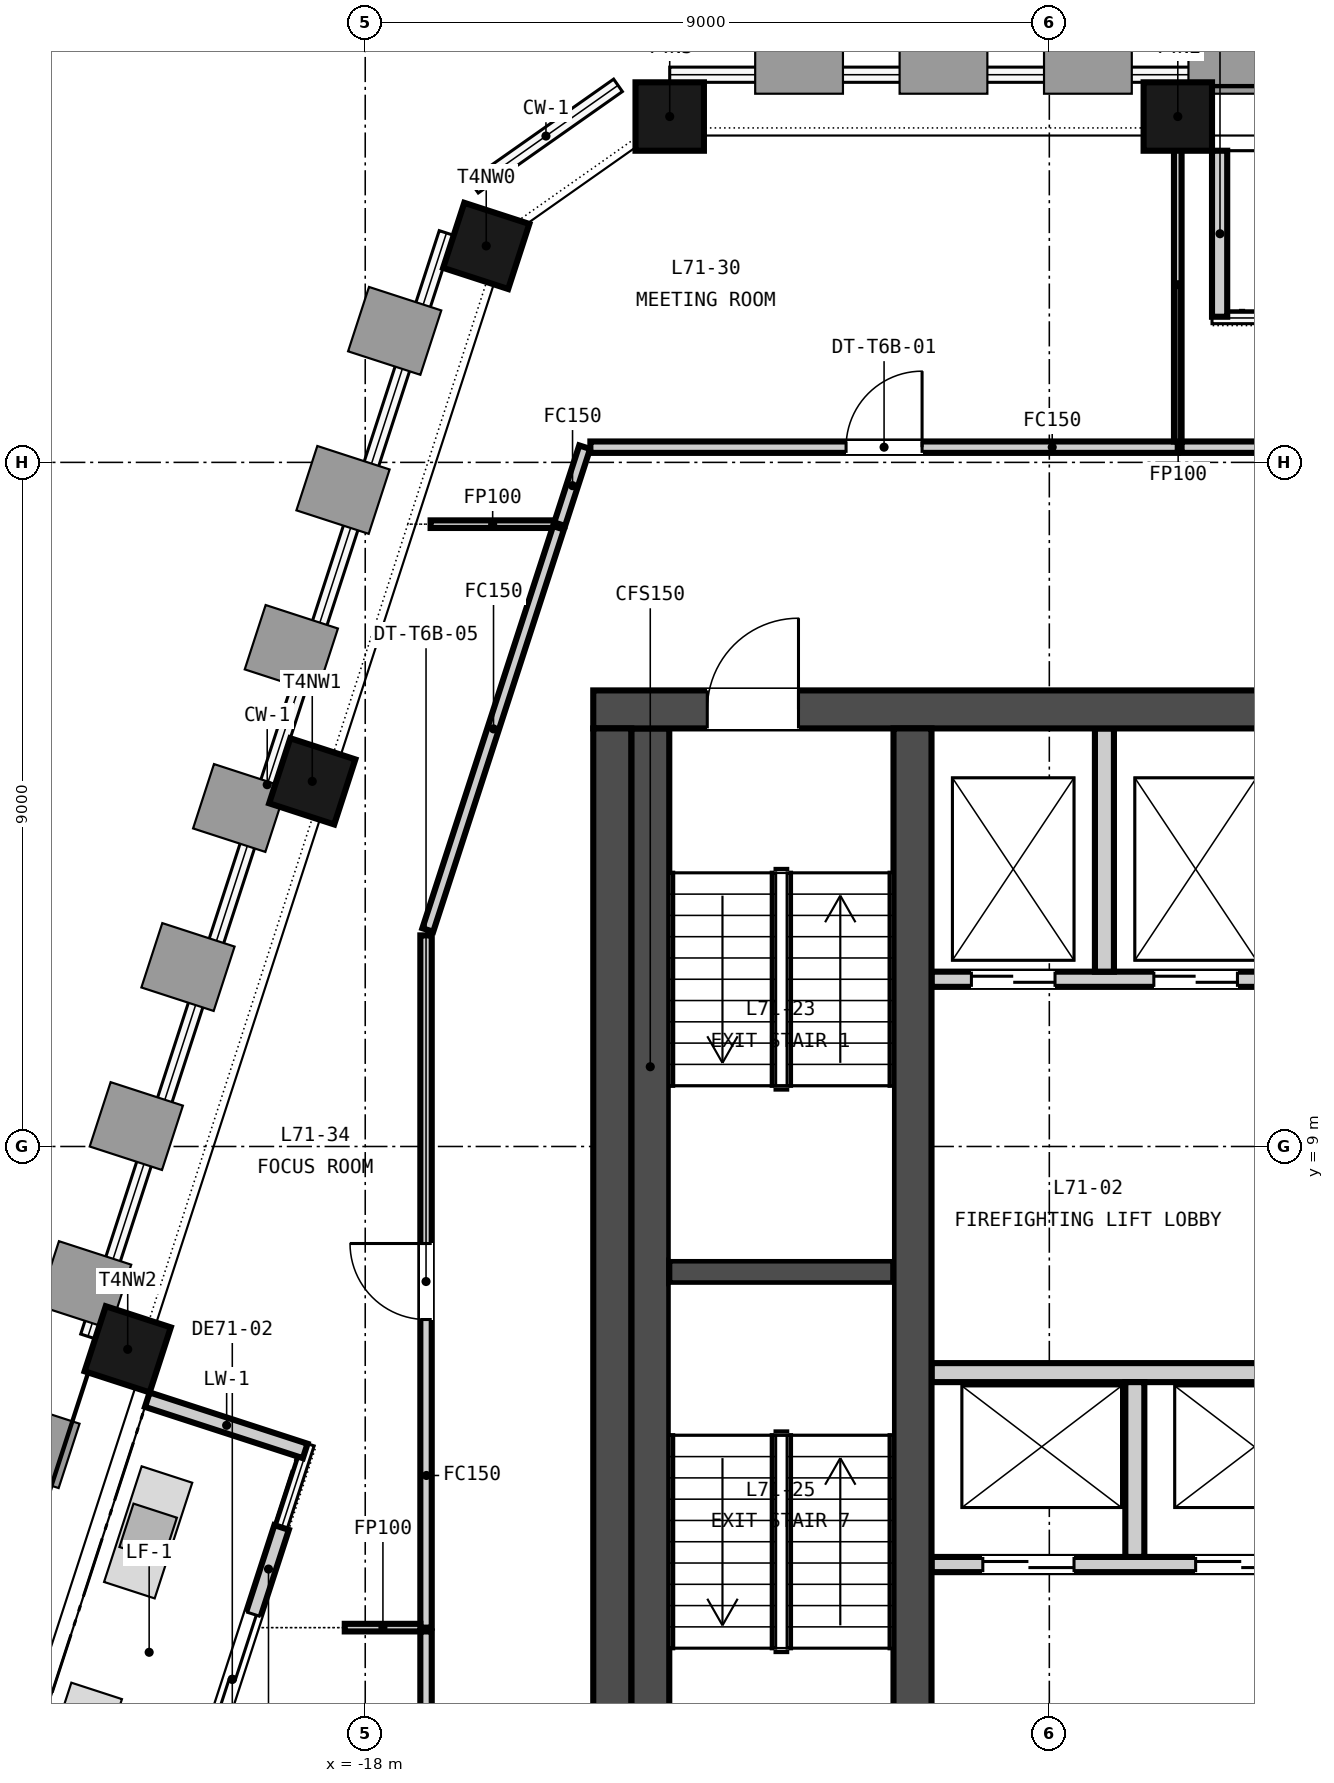
"""IFC4 building model, lengths in metres.
Left out: names, types, materials, properties, quantities, classifications, styles, units other than length and angle.
Written with IfcOpenShell. Run it as: python <this file> out.ifc"""

import sys

from ifc_helpers import new_model, si_unit, direction, frame, frame_2d, origin, origin_2d, place, context, subcontext, project, spatial, rectangle, extrude, element, fill, save


model = new_model("IFC4")
c1 = context("Model", 3, precision=1e-05, world=origin(), true_north=direction((0.0, 1.0)))
c2 = subcontext(c1, "Body", "Model", "MODEL_VIEW")
j1 = project(units=[si_unit("LENGTHUNIT", "METRE"), si_unit("PLANEANGLEUNIT", "RADIAN")], contexts=[c1])
p1 = place(None, origin())
s1 = spatial("IfcSite", under=j1, at=p1, CompositionType="ELEMENT")
p2 = place(p1, origin())
s2 = spatial("IfcBuilding", under=s1, at=p2, CompositionType="ELEMENT")
p3 = place(p2, frame((0.0, 0.0, 279.2)))
s3 = spatial("IfcBuildingStorey", under=s2, at=p3, CompositionType="ELEMENT", Elevation=279.2)
p4 = place(p3, frame((-15.0, 14.75, -0.15), z_axis=(0.0, 0.0, 1.0), x_axis=(1.0, 0.0, 0.0)))
e1 = element("IfcWall", 1, at=p4, inside=s3, PredefinedType="SOLIDWALL", context=c2, shape_type="SweptSolid", body=[
    extrude(rectangle(XDim=30.0, YDim=0.5, at=frame_2d((15.0, 0.0))), origin(), (0.0, 0.0, 1.0), 3.65),
])
p5 = place(p4, frame((9.25, 0.0, 0.15)))
e2 = element("IfcOpeningElement", 2, at=p5, cuts=e1, PredefinedType="OPENING", context=c2, shape_type="SweptSolid", body=[
    extrude(rectangle(XDim=1.5, YDim=2.1, at=frame_2d((0.75, 1.05))), frame((0.0, 0.26, 0.0), z_axis=(0.0, -1.0, 0.0), x_axis=(1.0, 0.0, 0.0)), (0.0, 0.0, 1.0), 0.52),
])
p6 = place(p4, frame((19.4, 0.0, 0.15)))
e3 = element("IfcOpeningElement", 3, at=p6, cuts=e1, PredefinedType="OPENING", context=c2, shape_type="SweptSolid", body=[
    extrude(rectangle(XDim=1.5, YDim=2.1, at=frame_2d((0.75, 1.05))), frame((0.0, 0.26, 0.0), z_axis=(0.0, -1.0, 0.0), x_axis=(1.0, 0.0, 0.0)), (0.0, 0.0, 1.0), 0.52),
])
p7 = place(p4, frame((1.5, 0.0, 0.15)))
e4 = element("IfcOpeningElement", 4, at=p7, cuts=e1, PredefinedType="OPENING", context=c2, shape_type="SweptSolid", body=[
    extrude(rectangle(XDim=1.2, YDim=2.1, at=frame_2d((0.6, 1.05))), frame((0.0, 0.26, 0.0), z_axis=(0.0, -1.0, 0.0), x_axis=(1.0, 0.0, 0.0)), (0.0, 0.0, 1.0), 0.52),
])
p8 = place(p4, frame((27.3, 0.0, 0.15)))
e5 = element("IfcOpeningElement", 5, at=p8, cuts=e1, PredefinedType="OPENING", context=c2, shape_type="SweptSolid", body=[
    extrude(rectangle(XDim=1.2, YDim=2.1, at=frame_2d((0.6, 1.05))), frame((0.0, 0.26, 0.0), z_axis=(0.0, -1.0, 0.0), x_axis=(1.0, 0.0, 0.0)), (0.0, 0.0, 1.0), 0.52),
])
for number, where, z_axis, x_axis in (
    (6, (-14.75, 0.5, -0.15), (0.0, 0.0, 1.0), (0.0, 1.0, 0.0)),
    (7, (-10.8, 0.5, -0.15), (0.0, 0.0, 1.0), (0.0, 1.0, 0.0)),
):
    element("IfcWall", number, at=place(p3, frame(where, z_axis=z_axis, x_axis=x_axis)), inside=s3, PredefinedType="SOLIDWALL", context=c2, shape_type="SweptSolid", body=[
        extrude(rectangle(XDim=14.0, YDim=0.5, at=frame_2d((7.0, 0.0))), origin(), (0.0, 0.0, 1.0), 3.65),
    ])
for number, where, z_axis, x_axis in (
    (8, (-7.31, 22.55, -0.15), (0.0, 0.0, 1.0), (-1.0, 0.0, 0.0)),
    (9, (-13.994, 22.55, -0.15), (0.0, 0.0, 1.0), (-1.0, 0.0, 0.0)),
    (10, (-16.408, 20.848, -0.15), (0.0, 0.0, 1.0), (-0.309, -0.951, 0.0)),
    (11, (-18.697, 13.804, -0.15), (0.0, 0.0, 1.0), (-0.309, -0.951, 0.0)),
    (12, (-21.125, 6.331, -0.15), (0.0, 0.0, 1.0), (-0.309, -0.951, 0.0)),
):
    element("IfcColumn", number, at=place(p3, frame(where, z_axis=z_axis, x_axis=x_axis)), inside=s3, PredefinedType="COLUMN", context=c2, shape_type="SweptSolid", body=[
        extrude(rectangle(XDim=0.9, YDim=0.9, at=origin_2d()), origin(), (0.0, 0.0, 1.0), 3.65),
    ])
p9 = place(p3, frame((-6.76, 22.1, 0.0), z_axis=(0.0, 0.0, 1.0), x_axis=(0.0, -1.0, 0.0)))
e13 = element("IfcWall", 13, at=p9, inside=s3, PredefinedType="SOLIDWALL", context=c2, shape_type="SweptSolid", body=[
    extrude(rectangle(XDim=2.184, YDim=0.2, at=frame_2d((1.092, 0.0))), origin(), (0.0, 0.0, 1.0), 3.05),
])
p10 = place(p3, frame((-19.1, 3.988, 0.0), z_axis=(0.0, 0.0, 1.0), x_axis=(-0.30901640812, -0.951056706781, 0.0)))
e14 = element("IfcWall", 14, at=p10, inside=s3, PredefinedType="SOLIDWALL", context=c2, shape_type="SweptSolid", body=[
    extrude(rectangle(XDim=4.2, YDim=0.2, at=frame_2d((2.1, 0.0))), origin(), (0.0, 0.0, 1.0), 2.897),
])
p11 = place(p10, frame((1.2, 0.0, 0.0)))
e15 = element("IfcOpeningElement", 15, at=p11, cuts=e14, PredefinedType="OPENING", context=c2, shape_type="SweptSolid", body=[
    extrude(rectangle(XDim=1.8, YDim=2.4, at=frame_2d((0.9, 1.2))), frame((0.0, 0.11, 0.0), z_axis=(0.0, -1.0, 0.0), x_axis=(1.0, 0.0, 0.0)), (0.0, 0.0, 1.0), 0.22),
])
p12 = place(p3, frame((-20.867, 5.669, 0.0), z_axis=(0.0, 0.0, 1.0), x_axis=(0.951059534302, -0.30900770575, 0.0)))
e16 = element("IfcWall", 16, at=p12, inside=s3, PredefinedType="SOLIDWALL", context=c2, shape_type="SweptSolid", body=[
    extrude(rectangle(XDim=2.184, YDim=0.2, at=frame_2d((1.092, 0.0))), origin(), (0.0, 0.0, 1.0), 3.05),
])
p13 = place(p3, frame((-10.55, 3.5, 0.0), z_axis=(0.0, 0.0, 1.0), x_axis=(1.0, 0.0, 0.0)))
e17 = element("IfcWall", 17, at=p13, inside=s3, PredefinedType="PARTITIONING", context=c2, shape_type="SweptSolid", body=[
    extrude(rectangle(XDim=21.1, YDim=0.2, at=frame_2d((10.55, 0.0))), origin(), (0.0, 0.0, 1.0), 3.5),
])
p14 = place(p13, frame((0.675, 0.0, 0.0)))
e18 = element("IfcOpeningElement", 18, at=p14, cuts=e17, PredefinedType="OPENING", context=c2, shape_type="SweptSolid", body=[
    extrude(rectangle(XDim=1.2, YDim=2.1, at=frame_2d((0.6, 1.05))), frame((0.0, 0.11, 0.0), z_axis=(0.0, -1.0, 0.0), x_axis=(1.0, 0.0, 0.0)), (0.0, 0.0, 1.0), 0.22),
])
p15 = place(p13, frame((3.475, 0.0, 0.0)))
e19 = element("IfcOpeningElement", 19, at=p15, cuts=e17, PredefinedType="OPENING", context=c2, shape_type="SweptSolid", body=[
    extrude(rectangle(XDim=1.2, YDim=2.1, at=frame_2d((0.6, 1.05))), frame((0.0, 0.11, 0.0), z_axis=(0.0, -1.0, 0.0), x_axis=(1.0, 0.0, 0.0)), (0.0, 0.0, 1.0), 0.22),
])
p16 = place(p13, frame((6.275, 0.0, 0.0)))
e20 = element("IfcOpeningElement", 20, at=p16, cuts=e17, PredefinedType="OPENING", context=c2, shape_type="SweptSolid", body=[
    extrude(rectangle(XDim=1.2, YDim=2.1, at=frame_2d((0.6, 1.05))), frame((0.0, 0.11, 0.0), z_axis=(0.0, -1.0, 0.0), x_axis=(1.0, 0.0, 0.0)), (0.0, 0.0, 1.0), 0.22),
])
p17 = place(p13, frame((9.075, 0.0, 0.0)))
e21 = element("IfcOpeningElement", 21, at=p17, cuts=e17, PredefinedType="OPENING", context=c2, shape_type="SweptSolid", body=[
    extrude(rectangle(XDim=1.2, YDim=2.1, at=frame_2d((0.6, 1.05))), frame((0.0, 0.11, 0.0), z_axis=(0.0, -1.0, 0.0), x_axis=(1.0, 0.0, 0.0)), (0.0, 0.0, 1.0), 0.22),
])
p18 = place(p13, frame((11.875, 0.0, 0.0)))
e22 = element("IfcOpeningElement", 22, at=p18, cuts=e17, PredefinedType="OPENING", context=c2, shape_type="SweptSolid", body=[
    extrude(rectangle(XDim=1.2, YDim=2.1, at=frame_2d((0.6, 1.05))), frame((0.0, 0.11, 0.0), z_axis=(0.0, -1.0, 0.0), x_axis=(1.0, 0.0, 0.0)), (0.0, 0.0, 1.0), 0.22),
])
p19 = place(p13, frame((14.675, 0.0, 0.0)))
e23 = element("IfcOpeningElement", 23, at=p19, cuts=e17, PredefinedType="OPENING", context=c2, shape_type="SweptSolid", body=[
    extrude(rectangle(XDim=1.2, YDim=2.1, at=frame_2d((0.6, 1.05))), frame((0.0, 0.11, 0.0), z_axis=(0.0, -1.0, 0.0), x_axis=(1.0, 0.0, 0.0)), (0.0, 0.0, 1.0), 0.22),
])
p20 = place(p13, frame((17.475, 0.0, 0.0)))
e24 = element("IfcOpeningElement", 24, at=p20, cuts=e17, PredefinedType="OPENING", context=c2, shape_type="SweptSolid", body=[
    extrude(rectangle(XDim=1.2, YDim=2.1, at=frame_2d((0.6, 1.05))), frame((0.0, 0.11, 0.0), z_axis=(0.0, -1.0, 0.0), x_axis=(1.0, 0.0, 0.0)), (0.0, 0.0, 1.0), 0.22),
])
p21 = place(p13, frame((19.9, 0.0, 0.0)))
e25 = element("IfcOpeningElement", 25, at=p21, cuts=e17, PredefinedType="OPENING", context=c2, shape_type="SweptSolid", body=[
    extrude(rectangle(XDim=0.9, YDim=2.1, at=frame_2d((0.45, 1.05))), frame((0.0, 0.11, 0.0), z_axis=(0.0, -1.0, 0.0), x_axis=(1.0, 0.0, 0.0)), (0.0, 0.0, 1.0), 0.22),
])
p22 = place(p3, frame((-10.55, 6.025, 0.0), z_axis=(0.0, 0.0, 1.0), x_axis=(1.0, 0.0, 0.0)))
e26 = element("IfcWall", 26, at=p22, inside=s3, PredefinedType="PARTITIONING", context=c2, shape_type="SweptSolid", body=[
    extrude(rectangle(XDim=21.1, YDim=0.25, at=frame_2d((10.55, 0.0))), origin(), (0.0, 0.0, 1.0), 3.5),
])
p23 = place(p3, frame((-10.55, 11.2, 0.0), z_axis=(0.0, 0.0, 1.0), x_axis=(1.0, 0.0, 0.0)))
e27 = element("IfcWall", 27, at=p23, inside=s3, PredefinedType="PARTITIONING", context=c2, shape_type="SweptSolid", body=[
    extrude(rectangle(XDim=4.8, YDim=0.2, at=frame_2d((2.4, 0.0))), origin(), (0.0, 0.0, 1.0), 3.5),
])
p24 = place(p23, frame((0.525, 0.0, 0.0)))
e28 = element("IfcOpeningElement", 28, at=p24, cuts=e27, PredefinedType="OPENING", context=c2, shape_type="SweptSolid", body=[
    extrude(rectangle(XDim=1.1, YDim=2.1, at=frame_2d((0.55, 1.05))), frame((0.0, 0.11, 0.0), z_axis=(0.0, -1.0, 0.0), x_axis=(1.0, 0.0, 0.0)), (0.0, 0.0, 1.0), 0.22),
])
p25 = place(p23, frame((2.925, 0.0, 0.0)))
e29 = element("IfcOpeningElement", 29, at=p25, cuts=e27, PredefinedType="OPENING", context=c2, shape_type="SweptSolid", body=[
    extrude(rectangle(XDim=1.1, YDim=2.1, at=frame_2d((0.55, 1.05))), frame((0.0, 0.11, 0.0), z_axis=(0.0, -1.0, 0.0), x_axis=(1.0, 0.0, 0.0)), (0.0, 0.0, 1.0), 0.22),
])
p26 = place(p3, frame((-7.875, 3.6, 0.0), z_axis=(0.0, 0.0, 1.0), x_axis=(0.0, 1.0, 0.0)))
e30 = element("IfcWall", 30, at=p26, inside=s3, PredefinedType="PARTITIONING", context=c2, shape_type="SweptSolid", body=[
    extrude(rectangle(XDim=2.3, YDim=0.25, at=frame_2d((1.15, 0.0))), origin(), (0.0, 0.0, 1.0), 3.5),
])
p27 = place(p3, frame((-8.275, 11.3, 0.0), z_axis=(0.0, 0.0, 1.0), x_axis=(0.0, 1.0, 0.0)))
e31 = element("IfcWall", 31, at=p27, inside=s3, PredefinedType="PARTITIONING", context=c2, shape_type="SweptSolid", body=[
    extrude(rectangle(XDim=3.2, YDim=0.25, at=frame_2d((1.6, 0.0))), origin(), (0.0, 0.0, 1.0), 3.5),
])
p28 = place(p3, frame((-14.0, 7.35, 0.0), z_axis=(0.0, 0.0, 1.0), x_axis=(1.0, 0.0, 0.0)))
e32 = element("IfcWall", 32, at=p28, inside=s3, PredefinedType="SOLIDWALL", context=c2, shape_type="SweptSolid", body=[
    extrude(rectangle(XDim=2.95, YDim=0.3, at=frame_2d((1.475, 0.0))), origin(), (0.0, 0.0, 1.0), 3.5),
])
p29 = place(p3, frame((-14.25, 0.5, 0.0), z_axis=(0.0, 0.0, 1.0), x_axis=(0.0, 1.0, 0.0)))
e33 = element("IfcWall", 33, at=p29, inside=s3, PredefinedType="SOLIDWALL", context=c2, shape_type="SweptSolid", body=[
    extrude(rectangle(XDim=14.0, YDim=0.5, at=frame_2d((7.0, 0.0))), origin(), (0.0, 0.0, 1.0), 3.5),
])
p30 = place(p3, frame((-15.442, 17.187, 0.0), z_axis=(0.0, 0.0, 1.0), x_axis=(0.308790594164, 0.951130048393, 0.0)))
e34 = element("IfcWall", 34, at=p30, inside=s3, PredefinedType="PARTITIONING", context=c2, shape_type="SweptSolid", body=[
    extrude(rectangle(XDim=1.065, YDim=0.15, at=frame_2d((0.532, 0.0))), origin(), (0.0, 0.0, 1.0), 2.751),
])
p31 = place(p3, frame((-15.038, 18.2, 0.0), z_axis=(0.0, 0.0, 1.0), x_axis=(1.0, 0.0, 0.0)))
e35 = element("IfcWall", 35, at=p31, inside=s3, PredefinedType="PARTITIONING", context=c2, shape_type="SweptSolid", body=[
    extrude(rectangle(XDim=7.728, YDim=0.15, at=frame_2d((3.864, 0.0))), origin(), (0.0, 0.0, 1.0), 2.751),
])
p32 = place(p31, frame((3.364, 0.0, 0.0)))
e36 = element("IfcOpeningElement", 36, at=p32, cuts=e35, PredefinedType="OPENING", context=c2, shape_type="SweptSolid", body=[
    extrude(rectangle(XDim=1.0, YDim=2.1, at=frame_2d((0.5, 1.05))), frame((0.0, 0.085, 0.0), z_axis=(0.0, -1.0, 0.0), x_axis=(1.0, 0.0, 0.0)), (0.0, 0.0, 1.0), 0.17),
])
p33 = place(p3, frame((-7.31, 18.275, 0.0), z_axis=(0.0, 0.0, 1.0), x_axis=(0.0, 1.0, 0.0)))
e37 = element("IfcWall", 37, at=p33, inside=s3, PredefinedType="PARTITIONING", context=c2, shape_type="SweptSolid", body=[
    extrude(rectangle(XDim=4.125, YDim=0.1, at=frame_2d((2.062, 0.0))), origin(), (0.0, 0.0, 1.0), 2.751),
])
p34 = place(p3, frame((-17.14, 17.187, 0.0), z_axis=(0.0, 0.0, 1.0), x_axis=(1.0, 0.0, 0.0)))
e38 = element("IfcWall", 38, at=p34, inside=s3, PredefinedType="PARTITIONING", context=c2, shape_type="SweptSolid", body=[
    extrude(rectangle(XDim=1.623, YDim=0.1, at=frame_2d((0.812, 0.0))), origin(), (0.0, 0.0, 1.0), 2.751),
])
p35 = place(p3, frame((-7.26, 18.2, 0.0), z_axis=(0.0, 0.0, 1.0), x_axis=(1.0, 0.0, 0.0)))
e39 = element("IfcWall", 39, at=p35, inside=s3, PredefinedType="PARTITIONING", context=c2, shape_type="SweptSolid", body=[
    extrude(rectangle(XDim=7.085, YDim=0.15, at=frame_2d((3.542, 0.0))), origin(), (0.0, 0.0, 1.0), 2.751),
])
p36 = place(p35, frame((3.042, 0.0, 0.0)))
e40 = element("IfcOpeningElement", 40, at=p36, cuts=e39, PredefinedType="OPENING", context=c2, shape_type="SweptSolid", body=[
    extrude(rectangle(XDim=1.0, YDim=2.1, at=frame_2d((0.5, 1.05))), frame((0.0, 0.085, 0.0), z_axis=(0.0, -1.0, 0.0), x_axis=(1.0, 0.0, 0.0)), (0.0, 0.0, 1.0), 0.17),
])
p37 = place(p3, frame((-17.2, 2.67, 0.0), z_axis=(0.0, 0.0, 1.0), x_axis=(0.0, 1.0, 0.0)))
e41 = element("IfcWall", 41, at=p37, inside=s3, PredefinedType="PARTITIONING", context=c2, shape_type="SweptSolid", body=[
    extrude(rectangle(XDim=9.107, YDim=0.15, at=frame_2d((4.554, 0.0))), origin(), (0.0, 0.0, 1.0), 2.751),
])
p38 = place(p37, frame((4.053, 0.0, 0.0)))
e42 = element("IfcOpeningElement", 42, at=p38, cuts=e41, PredefinedType="OPENING", context=c2, shape_type="SweptSolid", body=[
    extrude(rectangle(XDim=1.0, YDim=2.1, at=frame_2d((0.5, 1.05))), frame((0.0, 0.085, 0.0), z_axis=(0.0, -1.0, 0.0), x_axis=(1.0, 0.0, 0.0)), (0.0, 0.0, 1.0), 0.17),
])
p39 = place(p3, frame((-17.177, 11.848, 0.0), z_axis=(0.0, 0.0, 1.0), x_axis=(0.309030503714, 0.951052126739, 0.0)))
e43 = element("IfcWall", 43, at=p39, inside=s3, PredefinedType="PARTITIONING", context=c2, shape_type="SweptSolid", body=[
    extrude(rectangle(XDim=5.563, YDim=0.15, at=frame_2d((2.782, 0.0))), origin(), (0.0, 0.0, 1.0), 2.751),
])
p40 = place(p3, frame((-18.269, 2.67, 0.0), z_axis=(0.0, 0.0, 1.0), x_axis=(1.0, 0.0, 0.0)))
e44 = element("IfcWall", 44, at=p40, inside=s3, PredefinedType="PARTITIONING", context=c2, shape_type="SweptSolid", body=[
    extrude(rectangle(XDim=0.994, YDim=0.1, at=frame_2d((0.497, 0.0))), origin(), (0.0, 0.0, 1.0), 2.751),
])
p41 = place(p3, frame((-17.2, -3.725, 0.0), z_axis=(0.0, 0.0, 1.0), x_axis=(0.0, 1.0, 0.0)))
e45 = element("IfcWall", 45, at=p41, inside=s3, PredefinedType="PARTITIONING", context=c2, shape_type="SweptSolid", body=[
    extrude(rectangle(XDim=6.345, YDim=0.15, at=frame_2d((3.173, 0.0))), origin(), (0.0, 0.0, 1.0), 2.751),
])
p42 = place(p41, frame((2.272, 0.0, 0.0)))
e46 = element("IfcOpeningElement", 46, at=p42, cuts=e45, PredefinedType="OPENING", context=c2, shape_type="SweptSolid", body=[
    extrude(rectangle(XDim=1.8, YDim=2.1, at=frame_2d((0.9, 1.05))), frame((0.0, 0.085, 0.0), z_axis=(0.0, -1.0, 0.0), x_axis=(1.0, 0.0, 0.0)), (0.0, 0.0, 1.0), 0.17),
])
p43 = place(p11, origin())
e47 = element("IfcDoor", 47, at=p43, inside=s3, OperationType="SINGLE_SWING_LEFT", PredefinedType="DOOR", context=c2, shape_type="SweptSolid", body=[
    extrude(rectangle(XDim=1.8, YDim=2.4, at=frame_2d((0.9, 1.2))), frame((0.0, 0.025, 0.0), z_axis=(0.0, -1.0, 0.0), x_axis=(1.0, 0.0, 0.0)), (0.0, 0.0, 1.0), 0.05),
])
fill(e15, e47)
p44 = place(p14, origin())
e48 = element("IfcDoor", 48, at=p44, inside=s3, OperationType="DOUBLE_DOOR_SLIDING", PredefinedType="DOOR", context=c2, shape_type="SweptSolid", body=[
    extrude(rectangle(XDim=1.2, YDim=2.1, at=frame_2d((0.6, 1.05))), frame((0.0, 0.025, 0.0), z_axis=(0.0, -1.0, 0.0), x_axis=(1.0, 0.0, 0.0)), (0.0, 0.0, 1.0), 0.05),
])
fill(e18, e48)
p45 = place(p15, origin())
e49 = element("IfcDoor", 49, at=p45, inside=s3, OperationType="DOUBLE_DOOR_SLIDING", PredefinedType="DOOR", context=c2, shape_type="SweptSolid", body=[
    extrude(rectangle(XDim=1.2, YDim=2.1, at=frame_2d((0.6, 1.05))), frame((0.0, 0.025, 0.0), z_axis=(0.0, -1.0, 0.0), x_axis=(1.0, 0.0, 0.0)), (0.0, 0.0, 1.0), 0.05),
])
fill(e19, e49)
p46 = place(p24, origin())
e50 = element("IfcDoor", 50, at=p46, inside=s3, OperationType="DOUBLE_DOOR_SLIDING", PredefinedType="DOOR", context=c2, shape_type="SweptSolid", body=[
    extrude(rectangle(XDim=1.1, YDim=2.1, at=frame_2d((0.55, 1.05))), frame((0.0, 0.025, 0.0), z_axis=(0.0, -1.0, 0.0), x_axis=(1.0, 0.0, 0.0)), (0.0, 0.0, 1.0), 0.05),
])
fill(e28, e50)
p47 = place(p25, origin())
e51 = element("IfcDoor", 51, at=p47, inside=s3, OperationType="DOUBLE_DOOR_SLIDING", PredefinedType="DOOR", context=c2, shape_type="SweptSolid", body=[
    extrude(rectangle(XDim=1.1, YDim=2.1, at=frame_2d((0.55, 1.05))), frame((0.0, 0.025, 0.0), z_axis=(0.0, -1.0, 0.0), x_axis=(1.0, 0.0, 0.0)), (0.0, 0.0, 1.0), 0.05),
])
fill(e29, e51)
p48 = place(p7, origin())
e52 = element("IfcDoor", 52, at=p48, inside=s3, OperationType="SINGLE_SWING_RIGHT", PredefinedType="DOOR", context=c2, shape_type="SweptSolid", body=[
    extrude(rectangle(XDim=1.2, YDim=2.1, at=frame_2d((0.6, 1.05))), frame((0.0, 0.025, 0.0), z_axis=(0.0, -1.0, 0.0), x_axis=(1.0, 0.0, 0.0)), (0.0, 0.0, 1.0), 0.05),
])
fill(e4, e52)
p49 = place(p32, origin())
e53 = element("IfcDoor", 53, at=p49, inside=s3, OperationType="SINGLE_SWING_RIGHT", PredefinedType="DOOR", context=c2, shape_type="SweptSolid", body=[
    extrude(rectangle(XDim=1.0, YDim=2.1, at=frame_2d((0.5, 1.05))), frame((0.0, 0.025, 0.0), z_axis=(0.0, -1.0, 0.0), x_axis=(1.0, 0.0, 0.0)), (0.0, 0.0, 1.0), 0.05),
])
fill(e36, e53)
p50 = place(p38, origin())
e54 = element("IfcDoor", 54, at=p50, inside=s3, OperationType="SINGLE_SWING_RIGHT", PredefinedType="DOOR", context=c2, shape_type="SweptSolid", body=[
    extrude(rectangle(XDim=1.0, YDim=2.1, at=frame_2d((0.5, 1.05))), frame((0.0, 0.025, 0.0), z_axis=(0.0, -1.0, 0.0), x_axis=(1.0, 0.0, 0.0)), (0.0, 0.0, 1.0), 0.05),
])
fill(e42, e54)
save(model, sys.argv[1])
